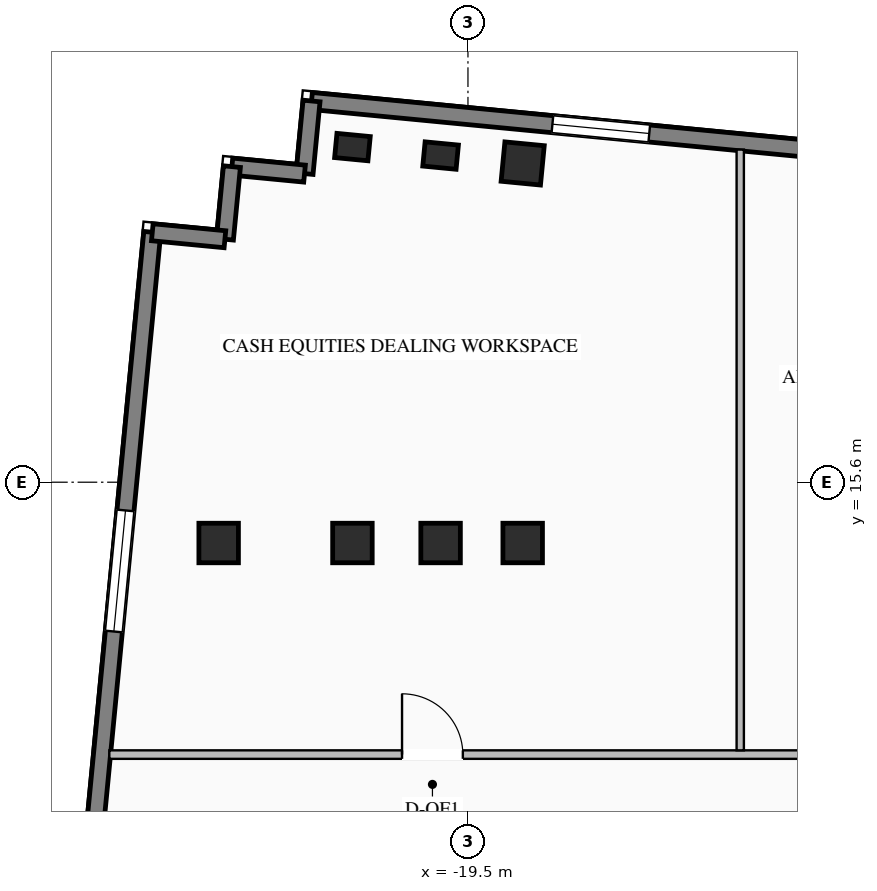
"""IFC4 building model, lengths in metres.
Left out: names, types, materials, properties, quantities, classifications, styles, units other than length and angle.
Written with IfcOpenShell. Run it as: python <this file> out.ifc"""

import sys

from ifc_helpers import new_model, si_unit, direction, frame, frame_2d, origin, origin_2d, place, context, subcontext, project, spatial, rectangle, i_section, extrude, element, fill, save


model = new_model("IFC4")
c1 = context("Model", 3, precision=1e-05, world=origin(), true_north=direction((0.0, 1.0)))
c2 = subcontext(c1, "Body", "Model", "MODEL_VIEW")
j1 = project(units=[si_unit("LENGTHUNIT", "METRE"), si_unit("PLANEANGLEUNIT", "RADIAN")], contexts=[c1])
p1 = place(None, origin())
s1 = spatial("IfcSite", under=j1, at=p1, CompositionType="ELEMENT")
p2 = place(p1, origin())
s2 = spatial("IfcBuilding", under=s1, at=p2, CompositionType="ELEMENT")
p3 = place(p2, frame((0.0, 0.0, 170.75)))
s3 = spatial("IfcBuildingStorey", under=s2, at=p3, CompositionType="ELEMENT", Elevation=170.75)
for number, where, z_axis, x_axis in (
    (1, (-21.4, 14.6, 0.0), (0.0, 0.0, 1.0), (1.0, 0.0, 0.0)),
    (2, (-19.95, 14.6, 0.0), (0.0, 0.0, 1.0), (1.0, 0.0, 0.0)),
    (3, (-18.6, 14.6, 0.0), (0.0, 0.0, 1.0), (1.0, 0.0, 0.0)),
    (4, (-23.6, 14.6, 0.0), (0.0, 0.0, 1.0), (1.0, 0.0, 0.0)),
    (5, (-18.6, 20.842, 0.0), (0.0, 0.0, 1.0), (0.995, -0.096, 0.0)),
):
    element("IfcColumn", number, at=place(p3, frame(where, z_axis=z_axis, x_axis=x_axis)), inside=s3, PredefinedType="COLUMN", context=c2, shape_type="SweptSolid", body=[
        extrude(i_section(OverallWidth=0.65, OverallDepth=0.65, WebThickness=0.028, FlangeThickness=0.04, at=origin_2d()), origin(), (0.0, 0.0, 1.0), 3.45),
    ])
for number, where, z_axis, x_axis in (
    (6, (-21.4, 21.112, 0.0), (0.0, 0.0, 1.0), (0.995, -0.096, 0.0)),
    (7, (-19.95, 20.972, 0.0), (0.0, 0.0, 1.0), (0.995, -0.096, 0.0)),
):
    element("IfcColumn", number, at=place(p3, frame(where, z_axis=z_axis, x_axis=x_axis)), inside=s3, PredefinedType="PILASTER", context=c2, shape_type="SweptSolid", body=[
        extrude(rectangle(XDim=0.55, YDim=0.4, at=origin_2d()), origin(), (0.0, 0.0, 1.0), 3.45),
    ])
p4 = place(p3, frame((-22.073, 21.87, 0.0), z_axis=(0.0, 0.0, 1.0), x_axis=(0.995395606285, -0.095851901334, 0.0)))
e8 = element("IfcWall", 8, at=p4, inside=s3, PredefinedType="STANDARD", context=c2, shape_type="SweptSolid", body=[
    extrude(rectangle(XDim=14.34, YDim=0.28, at=frame_2d((7.17, 0.0))), origin(), (0.0, 0.0, 1.0), 3.25),
])
p5 = place(p4, frame((3.98, 0.0, 0.76)))
e9 = element("IfcOpeningElement", 9, at=p5, cuts=e8, PredefinedType="OPENING", context=c2, shape_type="SweptSolid", body=[
    extrude(rectangle(XDim=1.6, YDim=1.95, at=frame_2d((0.8, 0.975))), frame((0.0, 0.15, 0.0), z_axis=(0.0, -1.0, 0.0), x_axis=(1.0, 0.0, 0.0)), (0.0, 0.0, 1.0), 0.3),
])
p6 = place(p4, frame((8.76, 0.0, 0.76)))
e10 = element("IfcOpeningElement", 10, at=p6, cuts=e8, PredefinedType="OPENING", context=c2, shape_type="SweptSolid", body=[
    extrude(rectangle(XDim=1.6, YDim=1.95, at=frame_2d((0.8, 0.975))), frame((0.0, 0.15, 0.0), z_axis=(0.0, -1.0, 0.0), x_axis=(1.0, 0.0, 0.0)), (0.0, 0.0, 1.0), 0.3),
])
p7 = place(p3, frame((-26.301, 2.998, 0.0), z_axis=(0.0, 0.0, 1.0), x_axis=(0.095837640115, 0.99539697947, 0.0)))
e11 = element("IfcWall", 11, at=p7, inside=s3, PredefinedType="STANDARD", context=c2, shape_type="SweptSolid", body=[
    extrude(rectangle(XDim=16.79, YDim=0.28, at=frame_2d((8.395, 0.0))), origin(), (0.0, 0.0, 1.0), 3.25),
])
p8 = place(p7, frame((3.547, 0.0, 0.76)))
e12 = element("IfcOpeningElement", 12, at=p8, cuts=e11, PredefinedType="OPENING", context=c2, shape_type="SweptSolid", body=[
    extrude(rectangle(XDim=2.0, YDim=2.05, at=frame_2d((1.0, 1.025))), frame((0.0, 0.15, 0.0), z_axis=(0.0, -1.0, 0.0), x_axis=(1.0, 0.0, 0.0)), (0.0, 0.0, 1.0), 0.3),
])
p9 = place(p7, frame((10.193, 0.0, 0.76)))
e13 = element("IfcOpeningElement", 13, at=p9, cuts=e11, PredefinedType="OPENING", context=c2, shape_type="SweptSolid", body=[
    extrude(rectangle(XDim=2.0, YDim=2.05, at=frame_2d((1.0, 1.025))), frame((0.0, 0.15, 0.0), z_axis=(0.0, -1.0, 0.0), x_axis=(1.0, 0.0, 0.0)), (0.0, 0.0, 1.0), 0.3),
])
for number, where, z_axis, x_axis in (
    (14, (-22.073, 21.87, 0.0), (0.0, 0.0, 1.0), (-0.096, -0.995, 0.0)),
    (15, (-22.188, 20.676, 0.0), (0.0, 0.0, 1.0), (-0.995, 0.096, 0.0)),
    (16, (-23.382, 20.791, 0.0), (0.0, 0.0, 1.0), (-0.096, -0.995, 0.0)),
    (17, (-23.497, 19.596, 0.0), (0.0, 0.0, 1.0), (-0.995, 0.096, 0.0)),
):
    element("IfcWall", number, at=place(p3, frame(where, z_axis=z_axis, x_axis=x_axis)), inside=s3, PredefinedType="STANDARD", context=c2, shape_type="SweptSolid", body=[
        extrude(rectangle(XDim=1.2, YDim=0.28, at=frame_2d((0.6, 0.0))), origin(), (0.0, 0.0, 1.0), 3.25),
    ])
p10 = place(p3, frame((-25.398, 11.12, 0.0), z_axis=(0.0, 0.0, 1.0), x_axis=(1.0, 0.0, 0.0)))
e18 = element("IfcWall", 18, at=p10, inside=s3, PredefinedType="STANDARD", context=c2, shape_type="SweptSolid", body=[
    extrude(rectangle(XDim=60.519, YDim=0.14, at=frame_2d((30.259, 0.0))), origin(), (0.0, 0.0, 1.0), 3.25),
])
p11 = place(p10, frame((4.814, 0.0, 0.0)))
e19 = element("IfcOpeningElement", 19, at=p11, cuts=e18, PredefinedType="OPENING", context=c2, shape_type="SweptSolid", body=[
    extrude(rectangle(XDim=1.0, YDim=2.08, at=frame_2d((0.5, 1.04))), frame((0.0, 0.08, 0.0), z_axis=(0.0, -1.0, 0.0), x_axis=(1.0, 0.0, 0.0)), (0.0, 0.0, 1.0), 0.16),
])
p12 = place(p10, frame((15.941, 0.0, 0.0)))
e20 = element("IfcOpeningElement", 20, at=p12, cuts=e18, PredefinedType="OPENING", context=c2, shape_type="SweptSolid", body=[
    extrude(rectangle(XDim=1.0, YDim=2.08, at=frame_2d((0.5, 1.04))), frame((0.0, 0.08, 0.0), z_axis=(0.0, -1.0, 0.0), x_axis=(1.0, 0.0, 0.0)), (0.0, 0.0, 1.0), 0.16),
])
p13 = place(p10, frame((28.676, 0.0, 0.0)))
e21 = element("IfcOpeningElement", 21, at=p13, cuts=e18, PredefinedType="OPENING", context=c2, shape_type="SweptSolid", body=[
    extrude(rectangle(XDim=1.0, YDim=2.08, at=frame_2d((0.5, 1.04))), frame((0.0, 0.08, 0.0), z_axis=(0.0, -1.0, 0.0), x_axis=(1.0, 0.0, 0.0)), (0.0, 0.0, 1.0), 0.16),
])
p14 = place(p10, frame((42.018, 0.0, 0.0)))
e22 = element("IfcOpeningElement", 22, at=p14, cuts=e18, PredefinedType="OPENING", context=c2, shape_type="SweptSolid", body=[
    extrude(rectangle(XDim=1.0, YDim=2.08, at=frame_2d((0.5, 1.04))), frame((0.0, 0.08, 0.0), z_axis=(0.0, -1.0, 0.0), x_axis=(1.0, 0.0, 0.0)), (0.0, 0.0, 1.0), 0.16),
])
p15 = place(p10, frame((54.228, 0.0, 0.0)))
e23 = element("IfcOpeningElement", 23, at=p15, cuts=e18, PredefinedType="OPENING", context=c2, shape_type="SweptSolid", body=[
    extrude(rectangle(XDim=1.0, YDim=2.08, at=frame_2d((0.5, 1.04))), frame((0.0, 0.08, 0.0), z_axis=(0.0, -1.0, 0.0), x_axis=(1.0, 0.0, 0.0)), (0.0, 0.0, 1.0), 0.16),
])
p16 = place(p3, frame((-15.022, 11.19, 0.0), z_axis=(0.0, 0.0, 1.0), x_axis=(0.0, 1.0, 0.0)))
e24 = element("IfcWall", 24, at=p16, inside=s3, PredefinedType="STANDARD", context=c2, shape_type="SweptSolid", body=[
    extrude(rectangle(XDim=9.881, YDim=0.12, at=frame_2d((4.94, 0.0))), origin(), (0.0, 0.0, 1.0), 3.25),
])
p17 = place(p5, origin())
e25 = element("IfcWindow", 25, at=p17, inside=s3, PartitioningType="SINGLE_PANEL", PredefinedType="WINDOW", context=c2, shape_type="SweptSolid", body=[
    extrude(rectangle(XDim=1.6, YDim=1.95, at=frame_2d((0.8, 0.975))), frame((0.0, 0.03, 0.0), z_axis=(0.0, -1.0, 0.0), x_axis=(1.0, 0.0, 0.0)), (0.0, 0.0, 1.0), 0.06),
])
fill(e9, e25)
p18 = place(p9, origin())
e26 = element("IfcWindow", 26, at=p18, inside=s3, PartitioningType="DOUBLE_PANEL_VERTICAL", PredefinedType="WINDOW", context=c2, shape_type="SweptSolid", body=[
    extrude(rectangle(XDim=2.0, YDim=2.05, at=frame_2d((1.0, 1.025))), frame((0.0, 0.03, 0.0), z_axis=(0.0, -1.0, 0.0), x_axis=(1.0, 0.0, 0.0)), (0.0, 0.0, 1.0), 0.06),
])
fill(e13, e26)
p19 = place(p11, origin())
e27 = element("IfcDoor", 27, at=p19, inside=s3, OperationType="SINGLE_SWING_LEFT", PredefinedType="DOOR", context=c2, shape_type="SweptSolid", body=[
    extrude(rectangle(XDim=1.0, YDim=2.08, at=frame_2d((0.5, 1.04))), frame((0.0, 0.025, 0.0), z_axis=(0.0, -1.0, 0.0), x_axis=(1.0, 0.0, 0.0)), (0.0, 0.0, 1.0), 0.05),
])
fill(e19, e27)
save(model, sys.argv[1])
